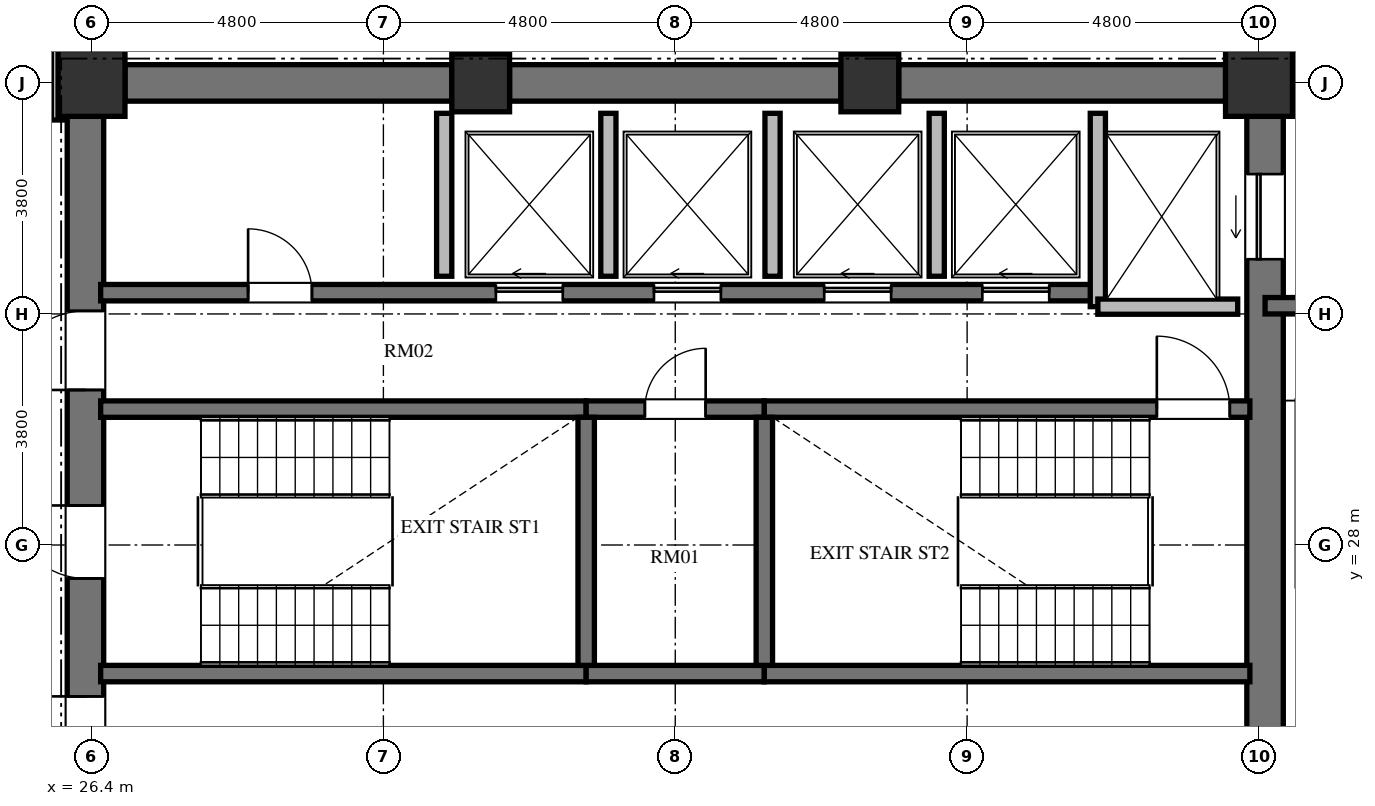
"""IFC4 building model, lengths in metres.
Left out: names, types, materials, properties, quantities, classifications, styles, units other than length and angle.
Written with IfcOpenShell. Run it as: python <this file> out.ifc"""

import sys

from ifc_helpers import new_model, si_unit, direction, frame, frame_2d, origin, origin_2d, place, context, subcontext, project, spatial, rectangle, extrude, element, fill, save


model = new_model("IFC4")
c1 = context("Model", 3, precision=1e-05, world=origin(), true_north=direction((0.0, 1.0)))
c2 = subcontext(c1, "Body", "Model", "MODEL_VIEW")
j1 = project(units=[si_unit("LENGTHUNIT", "METRE"), si_unit("PLANEANGLEUNIT", "RADIAN")], contexts=[c1])
p1 = place(None, origin())
s1 = spatial("IfcSite", under=j1, at=p1, CompositionType="ELEMENT")
p2 = place(p1, origin())
s2 = spatial("IfcBuilding", under=s1, at=p2, CompositionType="ELEMENT")
p3 = place(p2, frame((0.0, 0.0, 149.232)))
s3 = spatial("IfcBuildingStorey", under=s2, at=p3, CompositionType="ELEMENT", Elevation=149.232)
p4 = place(p3, frame((45.6, 35.6, 0.0), z_axis=(0.0, 0.0, 1.0), x_axis=(1.0, 0.0, 0.0)))
e1 = element("IfcColumn", 1, at=p4, inside=s3, PredefinedType="COLUMN", context=c2, shape_type="SweptSolid", body=[
    extrude(rectangle(XDim=1.1, YDim=1.1, at=origin_2d()), origin(), (0.0, 0.0, 1.0), 3.648),
])
for number, where, z_axis, x_axis in (
    (2, (39.2, 35.6, 0.0), (0.0, 0.0, 1.0), (1.0, 0.0, 0.0)),
    (3, (32.8, 35.6, 0.0), (0.0, 0.0, 1.0), (1.0, 0.0, 0.0)),
):
    element("IfcColumn", number, at=place(p3, frame(where, z_axis=z_axis, x_axis=x_axis)), inside=s3, PredefinedType="COLUMN", context=c2, shape_type="SweptSolid", body=[
        extrude(rectangle(XDim=0.95, YDim=0.95, at=origin_2d()), origin(), (0.0, 0.0, 1.0), 3.648),
    ])
p5 = place(p3, frame((26.4, 35.6, 0.0), z_axis=(0.0, 0.0, 1.0), x_axis=(1.0, 0.0, 0.0)))
e4 = element("IfcColumn", 4, at=p5, inside=s3, PredefinedType="COLUMN", context=c2, shape_type="SweptSolid", body=[
    extrude(rectangle(XDim=1.1, YDim=1.1, at=origin_2d()), origin(), (0.0, 0.0, 1.0), 3.648),
])
p6 = place(p3, frame((26.3, 20.95, 0.0), z_axis=(0.0, 0.0, 1.0), x_axis=(0.0, 1.0, 0.0)))
e5 = element("IfcWall", 5, at=p6, inside=s3, PredefinedType="SHEAR", context=c2, shape_type="SweptSolid", body=[
    extrude(rectangle(XDim=14.1, YDim=0.6, at=frame_2d((7.05, 0.0))), origin(), (0.0, 0.0, 1.0), 3.648),
])
p7 = place(p6, frame((6.5, 0.0, 0.0)))
e6 = element("IfcOpeningElement", 6, at=p7, cuts=e5, PredefinedType="OPENING", context=c2, shape_type="SweptSolid", body=[
    extrude(rectangle(XDim=1.2, YDim=2.15, at=frame_2d((0.6, 1.075))), frame((0.0, 0.31, 0.0), z_axis=(0.0, -1.0, 0.0), x_axis=(1.0, 0.0, 0.0)), (0.0, 0.0, 1.0), 0.62),
])
p8 = place(p6, frame((9.6, 0.0, 0.0)))
e7 = element("IfcOpeningElement", 7, at=p8, cuts=e5, PredefinedType="OPENING", context=c2, shape_type="SweptSolid", body=[
    extrude(rectangle(XDim=1.3, YDim=2.2, at=frame_2d((0.65, 1.1))), frame((0.0, 0.31, 0.0), z_axis=(0.0, -1.0, 0.0), x_axis=(1.0, 0.0, 0.0)), (0.0, 0.0, 1.0), 0.62),
])
p9 = place(p6, frame((3.26, 0.0, 0.0)))
e8 = element("IfcOpeningElement", 8, at=p9, cuts=e5, PredefinedType="OPENING", context=c2, shape_type="SweptSolid", body=[
    extrude(rectangle(XDim=1.3, YDim=2.2, at=frame_2d((0.65, 1.1))), frame((0.0, 0.31, 0.0), z_axis=(0.0, -1.0, 0.0), x_axis=(1.0, 0.0, 0.0)), (0.0, 0.0, 1.0), 0.62),
])
p10 = place(p3, frame((45.7, 20.95, 0.0), z_axis=(0.0, 0.0, 1.0), x_axis=(0.0, 1.0, 0.0)))
e9 = element("IfcWall", 9, at=p10, inside=s3, PredefinedType="SHEAR", context=c2, shape_type="SweptSolid", body=[
    extrude(rectangle(XDim=14.1, YDim=0.6, at=frame_2d((7.05, 0.0))), origin(), (0.0, 0.0, 1.0), 3.648),
])
p11 = place(p10, frame((11.75, 0.0, 0.0)))
e10 = element("IfcOpeningElement", 10, at=p11, cuts=e9, PredefinedType="OPENING", context=c2, shape_type="SweptSolid", body=[
    extrude(rectangle(XDim=1.4, YDim=2.3, at=frame_2d((0.7, 1.15))), frame((0.0, 0.31, 0.0), z_axis=(0.0, -1.0, 0.0), x_axis=(1.0, 0.0, 0.0)), (0.0, 0.0, 1.0), 0.62),
])
p12 = place(p10, frame((0.95, 0.0, 0.0)))
e11 = element("IfcOpeningElement", 11, at=p12, cuts=e9, PredefinedType="OPENING", context=c2, shape_type="SweptSolid", body=[
    extrude(rectangle(XDim=1.4, YDim=2.3, at=frame_2d((0.7, 1.15))), frame((0.0, 0.31, 0.0), z_axis=(0.0, -1.0, 0.0), x_axis=(1.0, 0.0, 0.0)), (0.0, 0.0, 1.0), 0.62),
])
p13 = place(p3, frame((26.95, 35.6, 0.0), z_axis=(0.0, 0.0, 1.0), x_axis=(1.0, 0.0, 0.0)))
e12 = element("IfcWall", 12, at=p13, inside=s3, PredefinedType="SHEAR", context=c2, shape_type="SweptSolid", body=[
    extrude(rectangle(XDim=5.375, YDim=0.6, at=frame_2d((2.688, 0.0))), origin(), (0.0, 0.0, 1.0), 3.648),
])
p14 = place(p3, frame((33.275, 35.6, 0.0), z_axis=(0.0, 0.0, 1.0), x_axis=(1.0, 0.0, 0.0)))
e13 = element("IfcWall", 13, at=p14, inside=s3, PredefinedType="SHEAR", context=c2, shape_type="SweptSolid", body=[
    extrude(rectangle(XDim=5.45, YDim=0.6, at=frame_2d((2.725, 0.0))), origin(), (0.0, 0.0, 1.0), 3.648),
])
p15 = place(p3, frame((39.675, 35.6, 0.0), z_axis=(0.0, 0.0, 1.0), x_axis=(1.0, 0.0, 0.0)))
e14 = element("IfcWall", 14, at=p15, inside=s3, PredefinedType="SHEAR", context=c2, shape_type="SweptSolid", body=[
    extrude(rectangle(XDim=5.375, YDim=0.6, at=frame_2d((2.688, 0.0))), origin(), (0.0, 0.0, 1.0), 3.648),
])
p16 = place(p3, frame((26.55, 30.235, 0.0), z_axis=(0.0, 0.0, 1.0), x_axis=(1.0, 0.0, 0.0)))
e15 = element("IfcWall", 15, at=p16, inside=s3, PredefinedType="SHEAR", context=c2, shape_type="SweptSolid", body=[
    extrude(rectangle(XDim=7.985, YDim=0.27, at=frame_2d((3.992, 0.0))), origin(), (0.0, 0.0, 1.0), 3.648),
])
p17 = place(p3, frame((34.535, 30.235, 0.0), z_axis=(0.0, 0.0, 1.0), x_axis=(1.0, 0.0, 0.0)))
e16 = element("IfcWall", 16, at=p17, inside=s3, PredefinedType="SHEAR", context=c2, shape_type="SweptSolid", body=[
    extrude(rectangle(XDim=2.93, YDim=0.27, at=frame_2d((1.465, 0.0))), origin(), (0.0, 0.0, 1.0), 3.648),
])
p18 = place(p17, frame((0.965, 0.0, 0.0)))
e17 = element("IfcOpeningElement", 17, at=p18, cuts=e16, PredefinedType="OPENING", context=c2, shape_type="SweptSolid", body=[
    extrude(rectangle(XDim=1.0, YDim=2.1, at=frame_2d((0.5, 1.05))), frame((0.0, 0.145, 0.0), z_axis=(0.0, -1.0, 0.0), x_axis=(1.0, 0.0, 0.0)), (0.0, 0.0, 1.0), 0.29),
])
p19 = place(p3, frame((37.465, 30.235, 0.0), z_axis=(0.0, 0.0, 1.0), x_axis=(1.0, 0.0, 0.0)))
e18 = element("IfcWall", 18, at=p19, inside=s3, PredefinedType="SHEAR", context=c2, shape_type="SweptSolid", body=[
    extrude(rectangle(XDim=7.985, YDim=0.27, at=frame_2d((3.992, 0.0))), origin(), (0.0, 0.0, 1.0), 3.648),
])
p20 = place(p19, frame((6.455, 0.0, 0.0)))
e19 = element("IfcOpeningElement", 19, at=p20, cuts=e18, PredefinedType="OPENING", context=c2, shape_type="SweptSolid", body=[
    extrude(rectangle(XDim=1.2, YDim=2.15, at=frame_2d((0.6, 1.075))), frame((0.0, 0.145, 0.0), z_axis=(0.0, -1.0, 0.0), x_axis=(1.0, 0.0, 0.0)), (0.0, 0.0, 1.0), 0.29),
])
p21 = place(p3, frame((26.55, 25.885, 0.0), z_axis=(0.0, 0.0, 1.0), x_axis=(1.0, 0.0, 0.0)))
e20 = element("IfcWall", 20, at=p21, inside=s3, PredefinedType="SHEAR", context=c2, shape_type="SweptSolid", body=[
    extrude(rectangle(XDim=7.985, YDim=0.27, at=frame_2d((3.992, 0.0))), origin(), (0.0, 0.0, 1.0), 3.648),
])
p22 = place(p3, frame((34.535, 25.885, 0.0), z_axis=(0.0, 0.0, 1.0), x_axis=(1.0, 0.0, 0.0)))
e21 = element("IfcWall", 21, at=p22, inside=s3, PredefinedType="SHEAR", context=c2, shape_type="SweptSolid", body=[
    extrude(rectangle(XDim=2.93, YDim=0.27, at=frame_2d((1.465, 0.0))), origin(), (0.0, 0.0, 1.0), 3.648),
])
p23 = place(p3, frame((37.465, 25.885, 0.0), z_axis=(0.0, 0.0, 1.0), x_axis=(1.0, 0.0, 0.0)))
e22 = element("IfcWall", 22, at=p23, inside=s3, PredefinedType="SHEAR", context=c2, shape_type="SweptSolid", body=[
    extrude(rectangle(XDim=7.985, YDim=0.27, at=frame_2d((3.992, 0.0))), origin(), (0.0, 0.0, 1.0), 3.648),
])
for number, where, z_axis, x_axis in (
    (23, (34.535, 26.02, 0.0), (0.0, 0.0, 1.0), (0.0, 1.0, 0.0)),
    (24, (37.465, 26.02, 0.0), (0.0, 0.0, 1.0), (0.0, 1.0, 0.0)),
):
    element("IfcWall", number, at=place(p3, frame(where, z_axis=z_axis, x_axis=x_axis)), inside=s3, PredefinedType="SHEAR", context=c2, shape_type="SweptSolid", body=[
        extrude(rectangle(XDim=4.08, YDim=0.27, at=frame_2d((2.04, 0.0))), origin(), (0.0, 0.0, 1.0), 3.648),
    ])
p24 = place(p3, frame((26.55, 32.15, 0.0), z_axis=(0.0, 0.0, 1.0), x_axis=(1.0, 0.0, 0.0)))
e25 = element("IfcWall", 25, at=p24, inside=s3, PredefinedType="SHEAR", context=c2, shape_type="SweptSolid", body=[
    extrude(rectangle(XDim=16.4, YDim=0.27, at=frame_2d((8.2, 0.0))), origin(), (0.0, 0.0, 1.0), 3.648),
])
p25 = place(p24, frame((2.425, 0.0, 0.0)))
e26 = element("IfcOpeningElement", 26, at=p25, cuts=e25, PredefinedType="OPENING", context=c2, shape_type="SweptSolid", body=[
    extrude(rectangle(XDim=1.05, YDim=2.15, at=frame_2d((0.525, 1.075))), frame((0.0, 0.145, 0.0), z_axis=(0.0, -1.0, 0.0), x_axis=(1.0, 0.0, 0.0)), (0.0, 0.0, 1.0), 0.29),
])
p26 = place(p24, frame((6.5, 0.0, 0.0)))
e27 = element("IfcOpeningElement", 27, at=p26, cuts=e25, PredefinedType="OPENING", context=c2, shape_type="SweptSolid", body=[
    extrude(rectangle(XDim=1.1, YDim=2.2, at=frame_2d((0.55, 1.1))), frame((0.0, 0.145, 0.0), z_axis=(0.0, -1.0, 0.0), x_axis=(1.0, 0.0, 0.0)), (0.0, 0.0, 1.0), 0.29),
])
p27 = place(p24, frame((9.1, 0.0, 0.0)))
e28 = element("IfcOpeningElement", 28, at=p27, cuts=e25, PredefinedType="OPENING", context=c2, shape_type="SweptSolid", body=[
    extrude(rectangle(XDim=1.1, YDim=2.2, at=frame_2d((0.55, 1.1))), frame((0.0, 0.145, 0.0), z_axis=(0.0, -1.0, 0.0), x_axis=(1.0, 0.0, 0.0)), (0.0, 0.0, 1.0), 0.29),
])
p28 = place(p24, frame((11.9, 0.0, 0.0)))
e29 = element("IfcOpeningElement", 29, at=p28, cuts=e25, PredefinedType="OPENING", context=c2, shape_type="SweptSolid", body=[
    extrude(rectangle(XDim=1.1, YDim=2.2, at=frame_2d((0.55, 1.1))), frame((0.0, 0.145, 0.0), z_axis=(0.0, -1.0, 0.0), x_axis=(1.0, 0.0, 0.0)), (0.0, 0.0, 1.0), 0.29),
])
p29 = place(p24, frame((14.5, 0.0, 0.0)))
e30 = element("IfcOpeningElement", 30, at=p29, cuts=e25, PredefinedType="OPENING", context=c2, shape_type="SweptSolid", body=[
    extrude(rectangle(XDim=1.1, YDim=2.2, at=frame_2d((0.55, 1.1))), frame((0.0, 0.145, 0.0), z_axis=(0.0, -1.0, 0.0), x_axis=(1.0, 0.0, 0.0)), (0.0, 0.0, 1.0), 0.29),
])
p30 = place(p3, frame((42.95, 31.92, 0.0), z_axis=(0.0, 0.0, 1.0), x_axis=(0.0, 1.0, 0.0)))
e31 = element("IfcWall", 31, at=p30, inside=s3, PredefinedType="SOLIDWALL", context=c2, shape_type="SweptSolid", body=[
    extrude(rectangle(XDim=3.18, YDim=0.25, at=frame_2d((1.59, 0.0))), origin(), (0.0, 0.0, 1.0), 3.428),
])
p31 = place(p3, frame((42.95, 31.92, 0.0), z_axis=(0.0, 0.0, 1.0), x_axis=(1.0, 0.0, 0.0)))
e32 = element("IfcWall", 32, at=p31, inside=s3, PredefinedType="SOLIDWALL", context=c2, shape_type="SweptSolid", body=[
    extrude(rectangle(XDim=2.3, YDim=0.25, at=frame_2d((1.15, 0.0))), origin(), (0.0, 0.0, 1.0), 3.428),
])
for number, where, z_axis, x_axis in (
    (33, (32.2, 32.42, 0.0), (0.0, 0.0, 1.0), (0.0, 1.0, 0.0)),
    (34, (34.9, 32.42, 0.0), (0.0, 0.0, 1.0), (0.0, 1.0, 0.0)),
    (35, (37.6, 32.42, 0.0), (0.0, 0.0, 1.0), (0.0, 1.0, 0.0)),
    (36, (40.3, 32.42, 0.0), (0.0, 0.0, 1.0), (0.0, 1.0, 0.0)),
):
    element("IfcWall", number, at=place(p3, frame(where, z_axis=z_axis, x_axis=x_axis)), inside=s3, PredefinedType="SOLIDWALL", context=c2, shape_type="SweptSolid", body=[
        extrude(rectangle(XDim=2.68, YDim=0.25, at=frame_2d((1.34, 0.0))), origin(), (0.0, 0.0, 1.0), 3.428),
    ])
p32 = place(p3, frame((46.0, 35.98, 0.0), z_axis=(0.0, 0.0, 1.0), x_axis=(1.0, 0.0, 0.0)))
e37 = element("IfcWall", 37, at=p32, inside=s3, PredefinedType="SHEAR", context=c2, shape_type="SweptSolid", body=[
    extrude(rectangle(XDim=4.55, YDim=0.27, at=frame_2d((2.275, 0.0))), origin(), (0.0, 0.0, 1.0), 3.648),
])
p33 = place(p3, frame((45.7, 31.935, 0.0), z_axis=(0.0, 0.0, 1.0), x_axis=(1.0, 0.0, 0.0)))
e38 = element("IfcWall", 38, at=p33, inside=s3, PredefinedType="SHEAR", context=c2, shape_type="SweptSolid", body=[
    extrude(rectangle(XDim=4.715, YDim=0.27, at=frame_2d((2.357, 0.0))), origin(), (0.0, 0.0, 1.0), 3.648),
])
p34 = place(p3, frame((25.83, 36.21, 0.0), z_axis=(0.0, 0.0, 1.0), x_axis=(0.0, -1.0, 0.0)))
e39 = element("IfcWall", 39, at=p34, inside=s3, PredefinedType="PARTITIONING", context=c2, shape_type="SweptSolid", body=[
    extrude(rectangle(XDim=1.22, YDim=0.18, at=frame_2d((0.61, 0.0))), origin(), (0.0, 0.0, 1.0), 3.428),
])
p35 = place(p7, origin())
e40 = element("IfcDoor", 40, at=p35, inside=s3, OperationType="SINGLE_SWING_RIGHT", PredefinedType="DOOR", context=c2, shape_type="SweptSolid", body=[
    extrude(rectangle(XDim=1.2, YDim=2.15, at=frame_2d((0.6, 1.075))), frame((0.0, 0.025, 0.0), z_axis=(0.0, -1.0, 0.0), x_axis=(1.0, 0.0, 0.0)), (0.0, 0.0, 1.0), 0.05),
])
fill(e6, e40)
p36 = place(p20, origin())
e41 = element("IfcDoor", 41, at=p36, inside=s3, OperationType="SINGLE_SWING_LEFT", PredefinedType="DOOR", context=c2, shape_type="SweptSolid", body=[
    extrude(rectangle(XDim=1.2, YDim=2.15, at=frame_2d((0.6, 1.075))), frame((0.0, 0.025, 0.0), z_axis=(0.0, -1.0, 0.0), x_axis=(1.0, 0.0, 0.0)), (0.0, 0.0, 1.0), 0.05),
])
fill(e19, e41)
p37 = place(p18, origin())
e42 = element("IfcDoor", 42, at=p37, inside=s3, OperationType="SINGLE_SWING_RIGHT", PredefinedType="DOOR", context=c2, shape_type="SweptSolid", body=[
    extrude(rectangle(XDim=1.0, YDim=2.1, at=frame_2d((0.5, 1.05))), frame((0.0, 0.025, 0.0), z_axis=(0.0, -1.0, 0.0), x_axis=(1.0, 0.0, 0.0)), (0.0, 0.0, 1.0), 0.05),
])
fill(e17, e42)
p38 = place(p8, origin())
e43 = element("IfcDoor", 43, at=p38, inside=s3, OperationType="SINGLE_SWING_LEFT", PredefinedType="DOOR", context=c2, shape_type="SweptSolid", body=[
    extrude(rectangle(XDim=1.3, YDim=2.2, at=frame_2d((0.65, 1.1))), frame((0.0, 0.025, 0.0), z_axis=(0.0, -1.0, 0.0), x_axis=(1.0, 0.0, 0.0)), (0.0, 0.0, 1.0), 0.05),
])
fill(e7, e43)
p39 = place(p9, origin())
e44 = element("IfcDoor", 44, at=p39, inside=s3, OperationType="SINGLE_SWING_RIGHT", PredefinedType="DOOR", context=c2, shape_type="SweptSolid", body=[
    extrude(rectangle(XDim=1.3, YDim=2.2, at=frame_2d((0.65, 1.1))), frame((0.0, 0.025, 0.0), z_axis=(0.0, -1.0, 0.0), x_axis=(1.0, 0.0, 0.0)), (0.0, 0.0, 1.0), 0.05),
])
fill(e8, e44)
p40 = place(p25, origin())
e45 = element("IfcDoor", 45, at=p40, inside=s3, OperationType="SINGLE_SWING_LEFT", PredefinedType="DOOR", context=c2, shape_type="SweptSolid", body=[
    extrude(rectangle(XDim=1.05, YDim=2.15, at=frame_2d((0.525, 1.075))), frame((0.0, 0.025, 0.0), z_axis=(0.0, -1.0, 0.0), x_axis=(1.0, 0.0, 0.0)), (0.0, 0.0, 1.0), 0.05),
])
fill(e26, e45)
p41 = place(p26, origin())
e46 = element("IfcDoor", 46, at=p41, inside=s3, OperationType="SLIDING_TO_LEFT", PredefinedType="DOOR", context=c2, shape_type="SweptSolid", body=[
    extrude(rectangle(XDim=1.1, YDim=2.2, at=frame_2d((0.55, 1.1))), frame((0.0, 0.025, 0.0), z_axis=(0.0, -1.0, 0.0), x_axis=(1.0, 0.0, 0.0)), (0.0, 0.0, 1.0), 0.05),
])
fill(e27, e46)
p42 = place(p27, origin())
e47 = element("IfcDoor", 47, at=p42, inside=s3, OperationType="SLIDING_TO_LEFT", PredefinedType="DOOR", context=c2, shape_type="SweptSolid", body=[
    extrude(rectangle(XDim=1.1, YDim=2.2, at=frame_2d((0.55, 1.1))), frame((0.0, 0.025, 0.0), z_axis=(0.0, -1.0, 0.0), x_axis=(1.0, 0.0, 0.0)), (0.0, 0.0, 1.0), 0.05),
])
fill(e28, e47)
p43 = place(p28, origin())
e48 = element("IfcDoor", 48, at=p43, inside=s3, OperationType="SLIDING_TO_LEFT", PredefinedType="DOOR", context=c2, shape_type="SweptSolid", body=[
    extrude(rectangle(XDim=1.1, YDim=2.2, at=frame_2d((0.55, 1.1))), frame((0.0, 0.025, 0.0), z_axis=(0.0, -1.0, 0.0), x_axis=(1.0, 0.0, 0.0)), (0.0, 0.0, 1.0), 0.05),
])
fill(e29, e48)
p44 = place(p29, origin())
e49 = element("IfcDoor", 49, at=p44, inside=s3, OperationType="SLIDING_TO_LEFT", PredefinedType="DOOR", context=c2, shape_type="SweptSolid", body=[
    extrude(rectangle(XDim=1.1, YDim=2.2, at=frame_2d((0.55, 1.1))), frame((0.0, 0.025, 0.0), z_axis=(0.0, -1.0, 0.0), x_axis=(1.0, 0.0, 0.0)), (0.0, 0.0, 1.0), 0.05),
])
fill(e30, e49)
p45 = place(p11, origin())
e50 = element("IfcDoor", 50, at=p45, inside=s3, OperationType="SLIDING_TO_LEFT", PredefinedType="DOOR", context=c2, shape_type="SweptSolid", body=[
    extrude(rectangle(XDim=1.4, YDim=2.3, at=frame_2d((0.7, 1.15))), frame((0.0, 0.025, 0.0), z_axis=(0.0, -1.0, 0.0), x_axis=(1.0, 0.0, 0.0)), (0.0, 0.0, 1.0), 0.05),
])
fill(e10, e50)
save(model, sys.argv[1])
